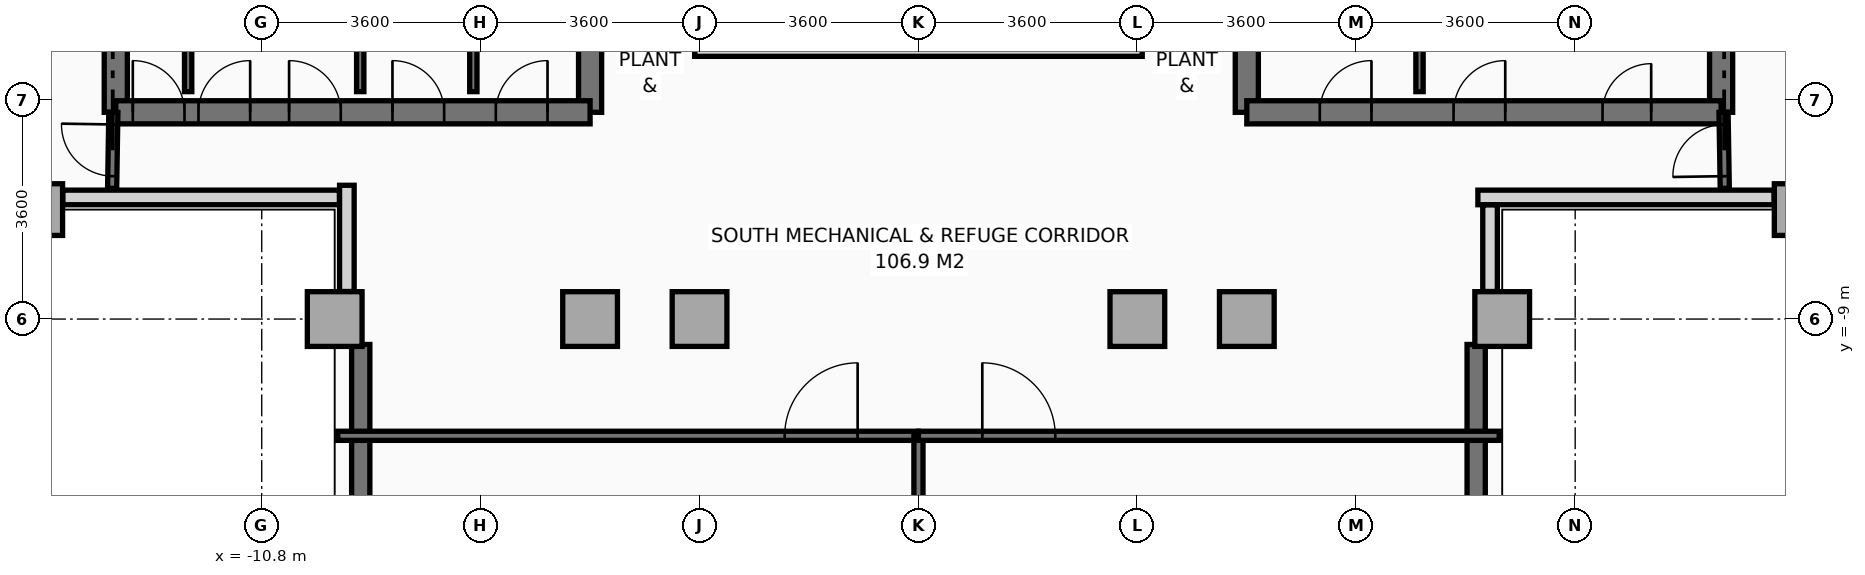
"""IFC4 building model, lengths in metres.
Left out: names, types, materials, properties, quantities, classifications, styles, units other than length and angle.
Written with IfcOpenShell. Run it as: python <this file> out.ifc"""

import sys

from ifc_helpers import new_model, si_unit, direction, frame, frame_2d, origin, origin_2d, place, context, subcontext, project, spatial, rectangle, extrude, source, transform, mapped, element, fill, save


model = new_model("IFC4")
c1 = context("Model", 3, precision=1e-05, world=origin(), true_north=direction((0.0, 1.0)))
c2 = subcontext(c1, "Body", "Model", "MODEL_VIEW")
j1 = project(units=[si_unit("LENGTHUNIT", "METRE"), si_unit("PLANEANGLEUNIT", "RADIAN")], contexts=[c1])
p1 = place(None, origin())
s1 = spatial("IfcSite", under=j1, at=p1, CompositionType="ELEMENT")
p2 = place(p1, origin())
s2 = spatial("IfcBuilding", under=s1, at=p2, CompositionType="ELEMENT")
p3 = place(p2, frame((0.0, 0.0, 214.8)))
s3 = spatial("IfcBuildingStorey", under=s2, at=p3, CompositionType="ELEMENT", Elevation=214.8)
m1 = source(origin(), c2, "Body", "SweptSolid", [
    extrude(rectangle(XDim=0.65, YDim=0.85, at=origin_2d()), origin(), (0.0, 0.0, 1.0), 4.41),
])
p4 = place(p3, frame((-14.4, -7.2, 0.0), z_axis=(0.0, 0.0, 1.0), x_axis=(1.0, 0.0, 0.0)))
e1 = element("IfcColumn", 1, at=p4, inside=s3, PredefinedType="COLUMN", context=c2, shape_type="MappedRepresentation", body=[
    mapped(m1, transform((0.0, 0.0, 0.0), x_axis=(1.0, 0.0, 0.0), y_axis=(0.0, 1.0, 0.0), z_axis=(0.0, 0.0, 1.0), scale=1.0)),
])
m2 = source(origin(), c2, "Body", "SweptSolid", [
    extrude(rectangle(XDim=0.9, YDim=0.9, at=origin_2d()), origin(), (0.0, 0.0, 1.0), 4.41),
])
for number, where, z_axis, x_axis in (
    (2, (-9.6, -9.0, 0.0), (0.0, 0.0, 1.0), (1.0, 0.0, 0.0)),
    (3, (-5.4, -9.0, 0.0), (0.0, 0.0, 1.0), (1.0, 0.0, 0.0)),
    (4, (-3.6, -9.0, 0.0), (0.0, 0.0, 1.0), (1.0, 0.0, 0.0)),
    (5, (3.6, -9.0, 0.0), (0.0, 0.0, 1.0), (1.0, 0.0, 0.0)),
    (6, (5.4, -9.0, 0.0), (0.0, 0.0, 1.0), (1.0, 0.0, 0.0)),
    (7, (9.6, -9.0, 0.0), (0.0, 0.0, 1.0), (1.0, 0.0, 0.0)),
):
    element("IfcColumn", number, at=place(p3, frame(where, z_axis=z_axis, x_axis=x_axis)), inside=s3, PredefinedType="COLUMN", context=c2, shape_type="MappedRepresentation", body=[
        mapped(m2, transform((0.0, 0.0, 0.0), x_axis=(1.0, 0.0, 0.0), y_axis=(0.0, 1.0, 0.0), z_axis=(0.0, 0.0, 1.0), scale=1.0)),
    ])
p5 = place(p3, frame((14.4, -7.2, 0.0), z_axis=(0.0, 0.0, 1.0), x_axis=(1.0, 0.0, 0.0)))
e8 = element("IfcColumn", 8, at=p5, inside=s3, PredefinedType="COLUMN", context=c2, shape_type="MappedRepresentation", body=[
    mapped(m1, transform((0.0, 0.0, 0.0), x_axis=(1.0, 0.0, 0.0), y_axis=(0.0, 1.0, 0.0), z_axis=(0.0, 0.0, 1.0), scale=1.0)),
])
for number, where, z_axis, x_axis in (
    (9, (-9.172, -9.418, 0.0), (0.0, 0.0, 1.0), (0.0, -1.0, 0.0)),
    (10, (9.172, -15.63, 0.0), (0.0, 0.0, 1.0), (0.0, 1.0, 0.0)),
):
    element("IfcWall", number, at=place(p3, frame(where, z_axis=z_axis, x_axis=x_axis)), inside=s3, PredefinedType="SOLIDWALL", context=c2, shape_type="SweptSolid", body=[
        extrude(rectangle(XDim=6.212, YDim=0.3, at=frame_2d((3.106, 0.0))), origin(), (0.0, 0.0, 1.0), 4.41),
    ])
p6 = place(p3, frame((14.072, -7.0, 0.0), z_axis=(0.0, 0.0, 1.0), x_axis=(-1.0, 0.0, 0.0)))
e11 = element("IfcWall", 11, at=p6, inside=s3, PredefinedType="PARAPET", context=c2, shape_type="SweptSolid", body=[
    extrude(rectangle(XDim=4.872, YDim=0.24, at=frame_2d((2.436, 0.0))), origin(), (0.0, 0.0, 1.0), 1.15),
])
p7 = place(p3, frame((9.4, -7.123, 0.0), z_axis=(0.0, 0.0, 1.0), x_axis=(0.0, -1.0, 0.0)))
e12 = element("IfcWall", 12, at=p7, inside=s3, PredefinedType="PARAPET", context=c2, shape_type="SweptSolid", body=[
    extrude(rectangle(XDim=1.424, YDim=0.24, at=frame_2d((0.712, 0.0))), origin(), (0.0, 0.0, 1.0), 1.15),
])
p8 = place(p3, frame((-9.4, -8.547, 0.0), z_axis=(0.0, 0.0, 1.0), x_axis=(0.0, 1.0, 0.0)))
e13 = element("IfcWall", 13, at=p8, inside=s3, PredefinedType="PARAPET", context=c2, shape_type="SweptSolid", body=[
    extrude(rectangle(XDim=1.747, YDim=0.24, at=frame_2d((0.874, 0.0))), origin(), (0.0, 0.0, 1.0), 1.15),
])
p9 = place(p3, frame((-9.523, -7.0, 0.0), z_axis=(0.0, 0.0, 1.0), x_axis=(-1.0, 0.0, 0.0)))
e14 = element("IfcWall", 14, at=p9, inside=s3, PredefinedType="PARAPET", context=c2, shape_type="SweptSolid", body=[
    extrude(rectangle(XDim=4.549, YDim=0.24, at=frame_2d((2.274, 0.0))), origin(), (0.0, 0.0, 1.0), 1.15),
])
p10 = place(p3, frame((-13.2, -5.6, 0.0), z_axis=(0.0, 0.0, 1.0), x_axis=(0.0, 1.0, 0.0)))
e15 = element("IfcWall", 15, at=p10, inside=s3, PredefinedType="SHEAR", context=c2, shape_type="SweptSolid", body=[
    extrude(rectangle(XDim=11.2, YDim=0.38, at=frame_2d((5.6, 0.0))), origin(), (0.0, 0.0, 1.0), 4.41),
])
p11 = place(p3, frame((-5.4, -5.6, 0.0), z_axis=(0.0, 0.0, 1.0), x_axis=(0.0, 1.0, 0.0)))
e16 = element("IfcWall", 16, at=p11, inside=s3, PredefinedType="SHEAR", context=c2, shape_type="SweptSolid", body=[
    extrude(rectangle(XDim=12.5, YDim=0.38, at=frame_2d((6.25, 0.0))), origin(), (0.0, 0.0, 1.0), 4.41),
])
p12 = place(p11, frame((4.55, 0.0, 0.0)))
e17 = element("IfcOpeningElement", 17, at=p12, cuts=e16, PredefinedType="OPENING", context=c2, shape_type="SweptSolid", body=[
    extrude(rectangle(XDim=1.2, YDim=2.2, at=frame_2d((0.6, 1.1))), frame((0.0, 0.2, 0.0), z_axis=(0.0, -1.0, 0.0), x_axis=(1.0, 0.0, 0.0)), (0.0, 0.0, 1.0), 0.4),
])
p13 = place(p11, frame((10.45, 0.0, 0.0)))
e18 = element("IfcOpeningElement", 18, at=p13, cuts=e16, PredefinedType="OPENING", context=c2, shape_type="SweptSolid", body=[
    extrude(rectangle(XDim=1.2, YDim=2.2, at=frame_2d((0.6, 1.1))), frame((0.0, 0.2, 0.0), z_axis=(0.0, -1.0, 0.0), x_axis=(1.0, 0.0, 0.0)), (0.0, 0.0, 1.0), 0.4),
])
p14 = place(p11, frame((6.86, 0.0, 0.0)))
e19 = element("IfcOpeningElement", 19, at=p14, cuts=e16, PredefinedType="OPENING", context=c2, shape_type="SweptSolid", body=[
    extrude(rectangle(XDim=0.8, YDim=2.1, at=frame_2d((0.4, 1.05))), frame((0.0, 0.2, 0.0), z_axis=(0.0, -1.0, 0.0), x_axis=(1.0, 0.0, 0.0)), (0.0, 0.0, 1.0), 0.4),
])
p15 = place(p3, frame((-13.2, -5.6, 0.0), z_axis=(0.0, 0.0, 1.0), x_axis=(1.0, 0.0, 0.0)))
e20 = element("IfcWall", 20, at=p15, inside=s3, PredefinedType="SHEAR", context=c2, shape_type="SweptSolid", body=[
    extrude(rectangle(XDim=7.8, YDim=0.38, at=frame_2d((3.9, 0.0))), origin(), (0.0, 0.0, 1.0), 4.41),
])
p16 = place(p15, frame((0.28, 0.0, 0.0)))
e21 = element("IfcOpeningElement", 21, at=p16, cuts=e20, PredefinedType="OPENING", context=c2, shape_type="SweptSolid", body=[
    extrude(rectangle(XDim=0.85, YDim=2.1, at=frame_2d((0.425, 1.05))), frame((0.0, 0.2, 0.0), z_axis=(0.0, -1.0, 0.0), x_axis=(1.0, 0.0, 0.0)), (0.0, 0.0, 1.0), 0.4),
])
p17 = place(p15, frame((1.36, 0.0, 0.0)))
e22 = element("IfcOpeningElement", 22, at=p17, cuts=e20, PredefinedType="OPENING", context=c2, shape_type="SweptSolid", body=[
    extrude(rectangle(XDim=0.85, YDim=2.1, at=frame_2d((0.425, 1.05))), frame((0.0, 0.2, 0.0), z_axis=(0.0, -1.0, 0.0), x_axis=(1.0, 0.0, 0.0)), (0.0, 0.0, 1.0), 0.4),
])
p18 = place(p15, frame((2.85, 0.0, 0.0)))
e23 = element("IfcOpeningElement", 23, at=p18, cuts=e20, PredefinedType="OPENING", context=c2, shape_type="SweptSolid", body=[
    extrude(rectangle(XDim=0.85, YDim=2.1, at=frame_2d((0.425, 1.05))), frame((0.0, 0.2, 0.0), z_axis=(0.0, -1.0, 0.0), x_axis=(1.0, 0.0, 0.0)), (0.0, 0.0, 1.0), 0.4),
])
p19 = place(p15, frame((4.55, 0.0, 0.0)))
e24 = element("IfcOpeningElement", 24, at=p19, cuts=e20, PredefinedType="OPENING", context=c2, shape_type="SweptSolid", body=[
    extrude(rectangle(XDim=0.85, YDim=2.1, at=frame_2d((0.425, 1.05))), frame((0.0, 0.2, 0.0), z_axis=(0.0, -1.0, 0.0), x_axis=(1.0, 0.0, 0.0)), (0.0, 0.0, 1.0), 0.4),
])
p20 = place(p15, frame((6.25, 0.0, 0.0)))
e25 = element("IfcOpeningElement", 25, at=p20, cuts=e20, PredefinedType="OPENING", context=c2, shape_type="SweptSolid", body=[
    extrude(rectangle(XDim=0.85, YDim=2.1, at=frame_2d((0.425, 1.05))), frame((0.0, 0.2, 0.0), z_axis=(0.0, -1.0, 0.0), x_axis=(1.0, 0.0, 0.0)), (0.0, 0.0, 1.0), 0.4),
])
p21 = place(p3, frame((13.2, -5.6, 0.0), z_axis=(0.0, 0.0, 1.0), x_axis=(0.0, 1.0, 0.0)))
e26 = element("IfcWall", 26, at=p21, inside=s3, PredefinedType="SHEAR", context=c2, shape_type="SweptSolid", body=[
    extrude(rectangle(XDim=11.2, YDim=0.38, at=frame_2d((5.6, 0.0))), origin(), (0.0, 0.0, 1.0), 4.41),
])
p22 = place(p3, frame((5.4, -5.6, 0.0), z_axis=(0.0, 0.0, 1.0), x_axis=(0.0, 1.0, 0.0)))
e27 = element("IfcWall", 27, at=p22, inside=s3, PredefinedType="SHEAR", context=c2, shape_type="SweptSolid", body=[
    extrude(rectangle(XDim=12.5, YDim=0.38, at=frame_2d((6.25, 0.0))), origin(), (0.0, 0.0, 1.0), 4.41),
])
p23 = place(p22, frame((4.55, 0.0, 0.0)))
e28 = element("IfcOpeningElement", 28, at=p23, cuts=e27, PredefinedType="OPENING", context=c2, shape_type="SweptSolid", body=[
    extrude(rectangle(XDim=1.2, YDim=2.2, at=frame_2d((0.6, 1.1))), frame((0.0, 0.2, 0.0), z_axis=(0.0, -1.0, 0.0), x_axis=(1.0, 0.0, 0.0)), (0.0, 0.0, 1.0), 0.4),
])
p24 = place(p22, frame((10.45, 0.0, 0.0)))
e29 = element("IfcOpeningElement", 29, at=p24, cuts=e27, PredefinedType="OPENING", context=c2, shape_type="SweptSolid", body=[
    extrude(rectangle(XDim=1.2, YDim=2.2, at=frame_2d((0.6, 1.1))), frame((0.0, 0.2, 0.0), z_axis=(0.0, -1.0, 0.0), x_axis=(1.0, 0.0, 0.0)), (0.0, 0.0, 1.0), 0.4),
])
p25 = place(p22, frame((6.86, 0.0, 0.0)))
e30 = element("IfcOpeningElement", 30, at=p25, cuts=e27, PredefinedType="OPENING", context=c2, shape_type="SweptSolid", body=[
    extrude(rectangle(XDim=0.8, YDim=2.1, at=frame_2d((0.4, 1.05))), frame((0.0, 0.2, 0.0), z_axis=(0.0, -1.0, 0.0), x_axis=(1.0, 0.0, 0.0)), (0.0, 0.0, 1.0), 0.4),
])
p26 = place(p22, frame((7.88, 0.0, 0.0)))
e31 = element("IfcOpeningElement", 31, at=p26, cuts=e27, PredefinedType="OPENING", context=c2, shape_type="SweptSolid", body=[
    extrude(rectangle(XDim=0.8, YDim=2.1, at=frame_2d((0.4, 1.05))), frame((0.0, 0.2, 0.0), z_axis=(0.0, -1.0, 0.0), x_axis=(1.0, 0.0, 0.0)), (0.0, 0.0, 1.0), 0.4),
])
p27 = place(p3, frame((5.4, -5.6, 0.0), z_axis=(0.0, 0.0, 1.0), x_axis=(1.0, 0.0, 0.0)))
e32 = element("IfcWall", 32, at=p27, inside=s3, PredefinedType="SHEAR", context=c2, shape_type="SweptSolid", body=[
    extrude(rectangle(XDim=7.8, YDim=0.38, at=frame_2d((3.9, 0.0))), origin(), (0.0, 0.0, 1.0), 4.41),
])
p28 = place(p27, frame((5.85, 0.0, 0.0)))
e33 = element("IfcOpeningElement", 33, at=p28, cuts=e32, PredefinedType="OPENING", context=c2, shape_type="SweptSolid", body=[
    extrude(rectangle(XDim=0.8, YDim=2.1, at=frame_2d((0.4, 1.05))), frame((0.0, 0.2, 0.0), z_axis=(0.0, -1.0, 0.0), x_axis=(1.0, 0.0, 0.0)), (0.0, 0.0, 1.0), 0.4),
])
p29 = place(p27, frame((1.2, 0.0, 0.0)))
e34 = element("IfcOpeningElement", 34, at=p29, cuts=e32, PredefinedType="OPENING", context=c2, shape_type="SweptSolid", body=[
    extrude(rectangle(XDim=0.85, YDim=2.1, at=frame_2d((0.425, 1.05))), frame((0.0, 0.2, 0.0), z_axis=(0.0, -1.0, 0.0), x_axis=(1.0, 0.0, 0.0)), (0.0, 0.0, 1.0), 0.4),
])
p30 = place(p27, frame((3.4, 0.0, 0.0)))
e35 = element("IfcOpeningElement", 35, at=p30, cuts=e32, PredefinedType="OPENING", context=c2, shape_type="SweptSolid", body=[
    extrude(rectangle(XDim=0.85, YDim=2.1, at=frame_2d((0.425, 1.05))), frame((0.0, 0.2, 0.0), z_axis=(0.0, -1.0, 0.0), x_axis=(1.0, 0.0, 0.0)), (0.0, 0.0, 1.0), 0.4),
])
for number, where, z_axis, x_axis in (
    (36, (-12.01, -5.26, 0.0), (0.0, 0.0, 1.0), (0.0, 1.0, 0.0)),
    (37, (-9.18, -5.26, 0.0), (0.0, 0.0, 1.0), (0.0, 1.0, 0.0)),
    (38, (-7.32, -5.26, 0.0), (0.0, 0.0, 1.0), (0.0, 1.0, 0.0)),
    (39, (8.24, -5.26, 0.0), (0.0, 0.0, 1.0), (0.0, 1.0, 0.0)),
):
    element("IfcWall", number, at=place(p3, frame(where, z_axis=z_axis, x_axis=x_axis)), inside=s3, PredefinedType="PARTITIONING", context=c2, shape_type="SweptSolid", body=[
        extrude(rectangle(XDim=2.94, YDim=0.12, at=frame_2d((1.47, 0.0))), origin(), (0.0, 0.0, 1.0), 4.41),
    ])
p31 = place(p3, frame((-13.26, -6.85, 0.0), z_axis=(0.0, 0.0, 1.0), x_axis=(0.016013571389, 0.999871774545, 0.0)))
e40 = element("IfcWall", 40, at=p31, inside=s3, PredefinedType="PARTITIONING", context=c2, shape_type="SweptSolid", body=[
    extrude(rectangle(XDim=1.25, YDim=0.15, at=frame_2d((0.625, 0.0))), origin(), (0.0, 0.0, 1.0), 4.41),
])
p32 = place(p31, frame((0.2, 0.0, 0.0)))
e41 = element("IfcOpeningElement", 41, at=p32, cuts=e40, PredefinedType="OPENING", context=c2, shape_type="SweptSolid", body=[
    extrude(rectangle(XDim=0.85, YDim=2.1, at=frame_2d((0.425, 1.05))), frame((0.0, 0.085, 0.0), z_axis=(0.0, -1.0, 0.0), x_axis=(1.0, 0.0, 0.0)), (0.0, 0.0, 1.0), 0.17),
])
p33 = place(p3, frame((13.26, -6.85, 0.0), z_axis=(0.0, 0.0, 1.0), x_axis=(-0.016013571389, 0.999871774545, 0.0)))
e42 = element("IfcWall", 42, at=p33, inside=s3, PredefinedType="PARTITIONING", context=c2, shape_type="SweptSolid", body=[
    extrude(rectangle(XDim=1.25, YDim=0.15, at=frame_2d((0.625, 0.0))), origin(), (0.0, 0.0, 1.0), 4.41),
])
p34 = place(p33, frame((0.2, 0.0, 0.0)))
e43 = element("IfcOpeningElement", 43, at=p34, cuts=e42, PredefinedType="OPENING", context=c2, shape_type="SweptSolid", body=[
    extrude(rectangle(XDim=0.85, YDim=2.1, at=frame_2d((0.425, 1.05))), frame((0.0, 0.085, 0.0), z_axis=(0.0, -1.0, 0.0), x_axis=(1.0, 0.0, 0.0)), (0.0, 0.0, 1.0), 0.17),
])
p35 = place(p3, frame((-9.55, -10.92, 0.0), z_axis=(0.0, 0.0, 1.0), x_axis=(1.0, 0.0, 0.0)))
e44 = element("IfcWall", 44, at=p35, inside=s3, PredefinedType="PARTITIONING", context=c2, shape_type="SweptSolid", body=[
    extrude(rectangle(XDim=9.55, YDim=0.15, at=frame_2d((4.775, 0.0))), origin(), (0.0, 0.0, 1.0), 4.41),
])
p36 = place(p35, frame((7.35, 0.0, 0.0)))
e45 = element("IfcOpeningElement", 45, at=p36, cuts=e44, PredefinedType="OPENING", context=c2, shape_type="SweptSolid", body=[
    extrude(rectangle(XDim=1.2, YDim=2.2, at=frame_2d((0.6, 1.1))), frame((0.0, 0.085, 0.0), z_axis=(0.0, -1.0, 0.0), x_axis=(1.0, 0.0, 0.0)), (0.0, 0.0, 1.0), 0.17),
])
p37 = place(p3, frame((0.0, -24.65, 0.0), z_axis=(0.0, 0.0, 1.0), x_axis=(0.0, 1.0, 0.0)))
e46 = element("IfcWall", 46, at=p37, inside=s3, PredefinedType="PARTITIONING", context=c2, shape_type="SweptSolid", body=[
    extrude(rectangle(XDim=13.73, YDim=0.15, at=frame_2d((6.865, 0.0))), origin(), (0.0, 0.0, 1.0), 3.96),
])
p38 = place(p3, frame((0.0, -10.92, 0.0), z_axis=(0.0, 0.0, 1.0), x_axis=(1.0, 0.0, 0.0)))
e47 = element("IfcWall", 47, at=p38, inside=s3, PredefinedType="PARTITIONING", context=c2, shape_type="SweptSolid", body=[
    extrude(rectangle(XDim=9.55, YDim=0.15, at=frame_2d((4.775, 0.0))), origin(), (0.0, 0.0, 1.0), 4.41),
])
p39 = place(p38, frame((1.05, 0.0, 0.0)))
e48 = element("IfcOpeningElement", 48, at=p39, cuts=e47, PredefinedType="OPENING", context=c2, shape_type="SweptSolid", body=[
    extrude(rectangle(XDim=1.2, YDim=2.2, at=frame_2d((0.6, 1.1))), frame((0.0, 0.085, 0.0), z_axis=(0.0, -1.0, 0.0), x_axis=(1.0, 0.0, 0.0)), (0.0, 0.0, 1.0), 0.17),
])
p40 = place(p3, frame((-3.68, -4.56, 0.0), z_axis=(0.0, 0.0, 1.0), x_axis=(1.0, 0.0, 0.0)))
e49 = element("IfcWall", 49, at=p40, inside=s3, PredefinedType="PARAPET", context=c2, shape_type="SweptSolid", body=[
    extrude(rectangle(XDim=7.36, YDim=0.24, at=frame_2d((3.68, 0.0))), origin(), (0.0, 0.0, 1.0), 1.15),
])
m3 = source(origin(), c2, "Body", "SweptSolid", [
    extrude(rectangle(XDim=0.85, YDim=2.1, at=frame_2d((0.425, 1.05))), frame((0.0, 0.025, 0.0), z_axis=(0.0, -1.0, 0.0), x_axis=(1.0, 0.0, 0.0)), (0.0, 0.0, 1.0), 0.05),
])
p41 = place(p16, origin())
e50 = element("IfcDoor", 50, at=p41, inside=s3, OperationType="SINGLE_SWING_LEFT", PredefinedType="DOOR", context=c2, shape_type="MappedRepresentation", body=[
    mapped(m3, transform((0.0, 0.0, 0.0), x_axis=(1.0, 0.0, 0.0), y_axis=(0.0, 1.0, 0.0), z_axis=(0.0, 0.0, 1.0), scale=1.0)),
])
fill(e21, e50)
p42 = place(p17, origin())
e51 = element("IfcDoor", 51, at=p42, inside=s3, OperationType="SINGLE_SWING_RIGHT", PredefinedType="DOOR", context=c2, shape_type="MappedRepresentation", body=[
    mapped(m3, transform((0.0, 0.0, 0.0), x_axis=(1.0, 0.0, 0.0), y_axis=(0.0, 1.0, 0.0), z_axis=(0.0, 0.0, 1.0), scale=1.0)),
])
fill(e22, e51)
m4 = source(origin(), c2, "Body", "SweptSolid", [
    extrude(rectangle(XDim=0.8, YDim=2.1, at=frame_2d((0.4, 1.05))), frame((0.0, 0.025, 0.0), z_axis=(0.0, -1.0, 0.0), x_axis=(1.0, 0.0, 0.0)), (0.0, 0.0, 1.0), 0.05),
])
p43 = place(p28, origin())
e52 = element("IfcDoor", 52, at=p43, inside=s3, OperationType="SINGLE_SWING_RIGHT", PredefinedType="DOOR", context=c2, shape_type="MappedRepresentation", body=[
    mapped(m4, transform((0.0, 0.0, 0.0), x_axis=(1.0, 0.0, 0.0), y_axis=(0.0, 1.0, 0.0), z_axis=(0.0, 0.0, 1.0), scale=1.0)),
])
fill(e33, e52)
p44 = place(p18, origin())
e53 = element("IfcDoor", 53, at=p44, inside=s3, OperationType="SINGLE_SWING_LEFT", PredefinedType="DOOR", context=c2, shape_type="MappedRepresentation", body=[
    mapped(m3, transform((0.0, 0.0, 0.0), x_axis=(1.0, 0.0, 0.0), y_axis=(0.0, 1.0, 0.0), z_axis=(0.0, 0.0, 1.0), scale=1.0)),
])
fill(e23, e53)
p45 = place(p19, origin())
e54 = element("IfcDoor", 54, at=p45, inside=s3, OperationType="SINGLE_SWING_LEFT", PredefinedType="DOOR", context=c2, shape_type="MappedRepresentation", body=[
    mapped(m3, transform((0.0, 0.0, 0.0), x_axis=(1.0, 0.0, 0.0), y_axis=(0.0, 1.0, 0.0), z_axis=(0.0, 0.0, 1.0), scale=1.0)),
])
fill(e24, e54)
p46 = place(p20, origin())
e55 = element("IfcDoor", 55, at=p46, inside=s3, OperationType="SINGLE_SWING_RIGHT", PredefinedType="DOOR", context=c2, shape_type="MappedRepresentation", body=[
    mapped(m3, transform((0.0, 0.0, 0.0), x_axis=(1.0, 0.0, 0.0), y_axis=(0.0, 1.0, 0.0), z_axis=(0.0, 0.0, 1.0), scale=1.0)),
])
fill(e25, e55)
p47 = place(p29, origin())
e56 = element("IfcDoor", 56, at=p47, inside=s3, OperationType="SINGLE_SWING_RIGHT", PredefinedType="DOOR", context=c2, shape_type="MappedRepresentation", body=[
    mapped(m3, transform((0.0, 0.0, 0.0), x_axis=(1.0, 0.0, 0.0), y_axis=(0.0, 1.0, 0.0), z_axis=(0.0, 0.0, 1.0), scale=1.0)),
])
fill(e34, e56)
p48 = place(p30, origin())
e57 = element("IfcDoor", 57, at=p48, inside=s3, OperationType="SINGLE_SWING_RIGHT", PredefinedType="DOOR", context=c2, shape_type="MappedRepresentation", body=[
    mapped(m3, transform((0.0, 0.0, 0.0), x_axis=(1.0, 0.0, 0.0), y_axis=(0.0, 1.0, 0.0), z_axis=(0.0, 0.0, 1.0), scale=1.0)),
])
fill(e35, e57)
p49 = place(p32, origin())
e58 = element("IfcDoor", 58, at=p49, inside=s3, OperationType="SINGLE_SWING_RIGHT", PredefinedType="DOOR", context=c2, shape_type="MappedRepresentation", body=[
    mapped(m3, transform((0.0, 0.0, 0.0), x_axis=(1.0, 0.0, 0.0), y_axis=(0.0, 1.0, 0.0), z_axis=(0.0, 0.0, 1.0), scale=1.0)),
])
fill(e41, e58)
p50 = place(p34, origin())
e59 = element("IfcDoor", 59, at=p50, inside=s3, OperationType="SINGLE_SWING_LEFT", PredefinedType="DOOR", context=c2, shape_type="MappedRepresentation", body=[
    mapped(m3, transform((0.0, 0.0, 0.0), x_axis=(1.0, 0.0, 0.0), y_axis=(0.0, 1.0, 0.0), z_axis=(0.0, 0.0, 1.0), scale=1.0)),
])
fill(e43, e59)
m5 = source(origin(), c2, "Body", "SweptSolid", [
    extrude(rectangle(XDim=1.2, YDim=2.2, at=frame_2d((0.6, 1.1))), frame((0.0, 0.025, 0.0), z_axis=(0.0, -1.0, 0.0), x_axis=(1.0, 0.0, 0.0)), (0.0, 0.0, 1.0), 0.05),
])
p51 = place(p36, origin())
e60 = element("IfcDoor", 60, at=p51, inside=s3, OperationType="SINGLE_SWING_RIGHT", PredefinedType="DOOR", context=c2, shape_type="MappedRepresentation", body=[
    mapped(m5, transform((0.0, 0.0, 0.0), x_axis=(1.0, 0.0, 0.0), y_axis=(0.0, 1.0, 0.0), z_axis=(0.0, 0.0, 1.0), scale=1.0)),
])
fill(e45, e60)
p52 = place(p39, origin())
e61 = element("IfcDoor", 61, at=p52, inside=s3, OperationType="SINGLE_SWING_LEFT", PredefinedType="DOOR", context=c2, shape_type="MappedRepresentation", body=[
    mapped(m5, transform((0.0, 0.0, 0.0), x_axis=(1.0, 0.0, 0.0), y_axis=(0.0, 1.0, 0.0), z_axis=(0.0, 0.0, 1.0), scale=1.0)),
])
fill(e48, e61)
save(model, sys.argv[1])
